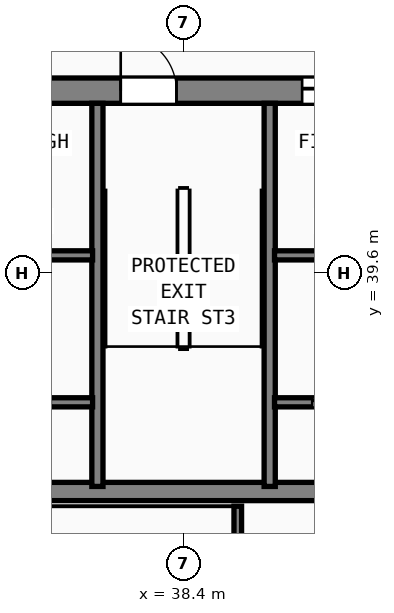
"""IFC4 building model, lengths in metres.
Left out: names, types, materials, properties, quantities, classifications, styles, units other than length and angle.
Written with IfcOpenShell. Run it as: python <this file> out.ifc"""

import sys

from ifc_helpers import new_model, si_unit, direction, frame, frame_2d, origin, place, context, subcontext, project, spatial, rectangle, extrude, element, fill, save


model = new_model("IFC4")
c1 = context("Model", 3, precision=1e-05, world=origin(), true_north=direction((0.0, 1.0)))
c2 = subcontext(c1, "Body", "Model", "MODEL_VIEW")
j1 = project(units=[si_unit("LENGTHUNIT", "METRE"), si_unit("PLANEANGLEUNIT", "RADIAN")], contexts=[c1])
p1 = place(None, origin())
s1 = spatial("IfcSite", under=j1, at=p1, CompositionType="ELEMENT")
p2 = place(p1, origin())
s2 = spatial("IfcBuilding", under=s1, at=p2, CompositionType="ELEMENT")
p3 = place(p2, frame((0.0, 0.0, 282.2)))
s3 = spatial("IfcBuildingStorey", under=s2, at=p3, CompositionType="ELEMENT", Elevation=282.2)
p4 = place(p3, frame((29.75, 43.2, 0.0), z_axis=(0.0, 0.0, 1.0), x_axis=(1.0, 0.0, 0.0)))
e1 = element("IfcWall", 1, at=p4, inside=s3, PredefinedType="SHEAR", context=c2, shape_type="SweptSolid", body=[
    extrude(rectangle(XDim=17.3, YDim=0.5, at=frame_2d((8.65, 0.0))), origin(), (0.0, 0.0, 1.0), 3.72),
])
p5 = place(p4, frame((2.3, 0.0, 0.0)))
e2 = element("IfcOpeningElement", 2, at=p5, cuts=e1, PredefinedType="OPENING", context=c2, shape_type="SweptSolid", body=[
    extrude(rectangle(XDim=1.1, YDim=2.15, at=frame_2d((0.55, 1.075))), frame((0.0, 0.26, 0.0), z_axis=(0.0, -1.0, 0.0), x_axis=(1.0, 0.0, 0.0)), (0.0, 0.0, 1.0), 0.52),
])
p6 = place(p4, frame((7.41, 0.0, 0.0)))
e3 = element("IfcOpeningElement", 3, at=p6, cuts=e1, PredefinedType="OPENING", context=c2, shape_type="SweptSolid", body=[
    extrude(rectangle(XDim=1.1, YDim=2.15, at=frame_2d((0.55, 1.075))), frame((0.0, 0.26, 0.0), z_axis=(0.0, -1.0, 0.0), x_axis=(1.0, 0.0, 0.0)), (0.0, 0.0, 1.0), 0.52),
])
p7 = place(p4, frame((13.5, 0.0, 0.0)))
e4 = element("IfcOpeningElement", 4, at=p7, cuts=e1, PredefinedType="OPENING", context=c2, shape_type="SweptSolid", body=[
    extrude(rectangle(XDim=1.1, YDim=2.15, at=frame_2d((0.55, 1.075))), frame((0.0, 0.26, 0.0), z_axis=(0.0, -1.0, 0.0), x_axis=(1.0, 0.0, 0.0)), (0.0, 0.0, 1.0), 0.52),
])
p8 = place(p4, frame((4.63, 0.0, 0.0)))
e5 = element("IfcOpeningElement", 5, at=p8, cuts=e1, PredefinedType="OPENING", context=c2, shape_type="SweptSolid", body=[
    extrude(rectangle(XDim=1.1, YDim=2.2, at=frame_2d((0.55, 1.1))), frame((0.0, 0.26, 0.0), z_axis=(0.0, -1.0, 0.0), x_axis=(1.0, 0.0, 0.0)), (0.0, 0.0, 1.0), 0.52),
])
p9 = place(p4, frame((10.99, 0.0, 0.0)))
e6 = element("IfcOpeningElement", 6, at=p9, cuts=e1, PredefinedType="OPENING", context=c2, shape_type="SweptSolid", body=[
    extrude(rectangle(XDim=1.1, YDim=2.2, at=frame_2d((0.55, 1.1))), frame((0.0, 0.26, 0.0), z_axis=(0.0, -1.0, 0.0), x_axis=(1.0, 0.0, 0.0)), (0.0, 0.0, 1.0), 0.52),
])
p10 = place(p3, frame((30.25, 35.29, 0.0), z_axis=(0.0, 0.0, 1.0), x_axis=(1.0, 0.0, 0.0)))
e7 = element("IfcWall", 7, at=p10, inside=s3, PredefinedType="SHEAR", context=c2, shape_type="SweptSolid", body=[
    extrude(rectangle(XDim=16.3, YDim=0.36, at=frame_2d((8.15, 0.0))), origin(), (0.0, 0.0, 1.0), 3.72),
])
p11 = place(p10, frame((5.1, 0.0, 0.0), z_axis=(0.0, 0.0, 1.0), x_axis=(-1.0, 0.0, 0.0)))
e8 = element("IfcOpeningElement", 8, at=p11, cuts=e7, PredefinedType="OPENING", context=c2, shape_type="SweptSolid", body=[
    extrude(rectangle(XDim=0.9, YDim=2.1, at=frame_2d((0.45, 1.05))), frame((0.0, 0.19, 0.0), z_axis=(0.0, -1.0, 0.0), x_axis=(1.0, 0.0, 0.0)), (0.0, 0.0, 1.0), 0.38),
])
p12 = place(p10, frame((12.16, 0.0, 0.0), z_axis=(0.0, 0.0, 1.0), x_axis=(-1.0, 0.0, 0.0)))
e9 = element("IfcOpeningElement", 9, at=p12, cuts=e7, PredefinedType="OPENING", context=c2, shape_type="SweptSolid", body=[
    extrude(rectangle(XDim=0.9, YDim=2.1, at=frame_2d((0.45, 1.05))), frame((0.0, 0.19, 0.0), z_axis=(0.0, -1.0, 0.0), x_axis=(1.0, 0.0, 0.0)), (0.0, 0.0, 1.0), 0.38),
])
for number, where, z_axis, x_axis in (
    (10, (36.7, 35.39, 0.0), (0.0, 0.0, 1.0), (0.0, 1.0, 0.0)),
    (11, (40.1, 35.39, 0.0), (0.0, 0.0, 1.0), (0.0, 1.0, 0.0)),
):
    element("IfcWall", number, at=place(p3, frame(where, z_axis=z_axis, x_axis=x_axis)), inside=s3, PredefinedType="SHEAR", context=c2, shape_type="SweptSolid", body=[
        extrude(rectangle(XDim=7.56, YDim=0.22, at=frame_2d((3.78, 0.0))), origin(), (0.0, 0.0, 1.0), 3.72),
    ])
for number, where, z_axis, x_axis in (
    (12, (33.835, 39.95, 0.0), (0.0, 0.0, 1.0), (1.0, 0.0, 0.0)),
    (13, (40.195, 39.95, 0.0), (0.0, 0.0, 1.0), (1.0, 0.0, 0.0)),
):
    element("IfcWall", number, at=place(p3, frame(where, z_axis=z_axis, x_axis=x_axis)), inside=s3, PredefinedType="SOLIDWALL", context=c2, shape_type="SweptSolid", body=[
        extrude(rectangle(XDim=2.77, YDim=0.18, at=frame_2d((1.385, 0.0))), origin(), (0.0, 0.0, 1.0), 3.72),
    ])
p13 = place(p3, frame((33.835, 37.05, 0.0), z_axis=(0.0, 0.0, 1.0), x_axis=(1.0, 0.0, 0.0)))
e14 = element("IfcWall", 14, at=p13, inside=s3, PredefinedType="SOLIDWALL", context=c2, shape_type="SweptSolid", body=[
    extrude(rectangle(XDim=2.77, YDim=0.18, at=frame_2d((1.385, 0.0))), origin(), (0.0, 0.0, 1.0), 3.72),
])
p14 = place(p13, frame((1.945, 0.0, 0.0), z_axis=(0.0, 0.0, 1.0), x_axis=(-1.0, 0.0, 0.0)))
e15 = element("IfcOpeningElement", 15, at=p14, cuts=e14, PredefinedType="OPENING", context=c2, shape_type="SweptSolid", body=[
    extrude(rectangle(XDim=1.2, YDim=2.2, at=frame_2d((0.6, 1.1))), frame((0.0, 0.1, 0.0), z_axis=(0.0, -1.0, 0.0), x_axis=(1.0, 0.0, 0.0)), (0.0, 0.0, 1.0), 0.2),
])
p15 = place(p3, frame((40.195, 37.05, 0.0), z_axis=(0.0, 0.0, 1.0), x_axis=(1.0, 0.0, 0.0)))
e16 = element("IfcWall", 16, at=p15, inside=s3, PredefinedType="SOLIDWALL", context=c2, shape_type="SweptSolid", body=[
    extrude(rectangle(XDim=2.77, YDim=0.18, at=frame_2d((1.385, 0.0))), origin(), (0.0, 0.0, 1.0), 3.72),
])
p16 = place(p15, frame((1.945, 0.0, 0.0), z_axis=(0.0, 0.0, 1.0), x_axis=(-1.0, 0.0, 0.0)))
e17 = element("IfcOpeningElement", 17, at=p16, cuts=e16, PredefinedType="OPENING", context=c2, shape_type="SweptSolid", body=[
    extrude(rectangle(XDim=1.2, YDim=2.2, at=frame_2d((0.6, 1.1))), frame((0.0, 0.1, 0.0), z_axis=(0.0, -1.0, 0.0), x_axis=(1.0, 0.0, 0.0)), (0.0, 0.0, 1.0), 0.2),
])
p17 = place(p3, frame((39.47, 32.95, 0.0), z_axis=(0.0, 0.0, 1.0), x_axis=(0.0, 1.0, 0.0)))
e18 = element("IfcWall", 18, at=p17, inside=s3, PredefinedType="SOLIDWALL", context=c2, shape_type="SweptSolid", body=[
    extrude(rectangle(XDim=2.05, YDim=0.15, at=frame_2d((1.025, 0.0))), origin(), (0.0, 0.0, 1.0), 3.72),
])
p18 = place(p6, origin())
e19 = element("IfcDoor", 19, at=p18, inside=s3, OperationType="SINGLE_SWING_LEFT", PredefinedType="DOOR", context=c2, shape_type="SweptSolid", body=[
    extrude(rectangle(XDim=1.1, YDim=2.15, at=frame_2d((0.55, 1.075))), frame((0.0, 0.185, 0.0), z_axis=(0.0, -1.0, 0.0), x_axis=(1.0, 0.0, 0.0)), (0.0, 0.0, 1.0), 0.05),
])
fill(e3, e19)
p19 = place(p9, origin())
e20 = element("IfcDoor", 20, at=p19, inside=s3, OperationType="SLIDING_TO_LEFT", PredefinedType="DOOR", context=c2, shape_type="SweptSolid", body=[
    extrude(rectangle(XDim=1.1, YDim=2.2, at=frame_2d((0.55, 1.1))), frame((0.0, 0.185, 0.0), z_axis=(0.0, -1.0, 0.0), x_axis=(1.0, 0.0, 0.0)), (0.0, 0.0, 1.0), 0.05),
])
fill(e6, e20)
p20 = place(p16, origin())
e21 = element("IfcDoor", 21, at=p20, inside=s3, OperationType="SLIDING_TO_RIGHT", PredefinedType="DOOR", context=c2, shape_type="SweptSolid", body=[
    extrude(rectangle(XDim=1.2, YDim=2.2, at=frame_2d((0.6, 1.1))), frame((0.0, 0.025, 0.0), z_axis=(0.0, -1.0, 0.0), x_axis=(1.0, 0.0, 0.0)), (0.0, 0.0, 1.0), 0.05),
])
fill(e17, e21)
save(model, sys.argv[1])
